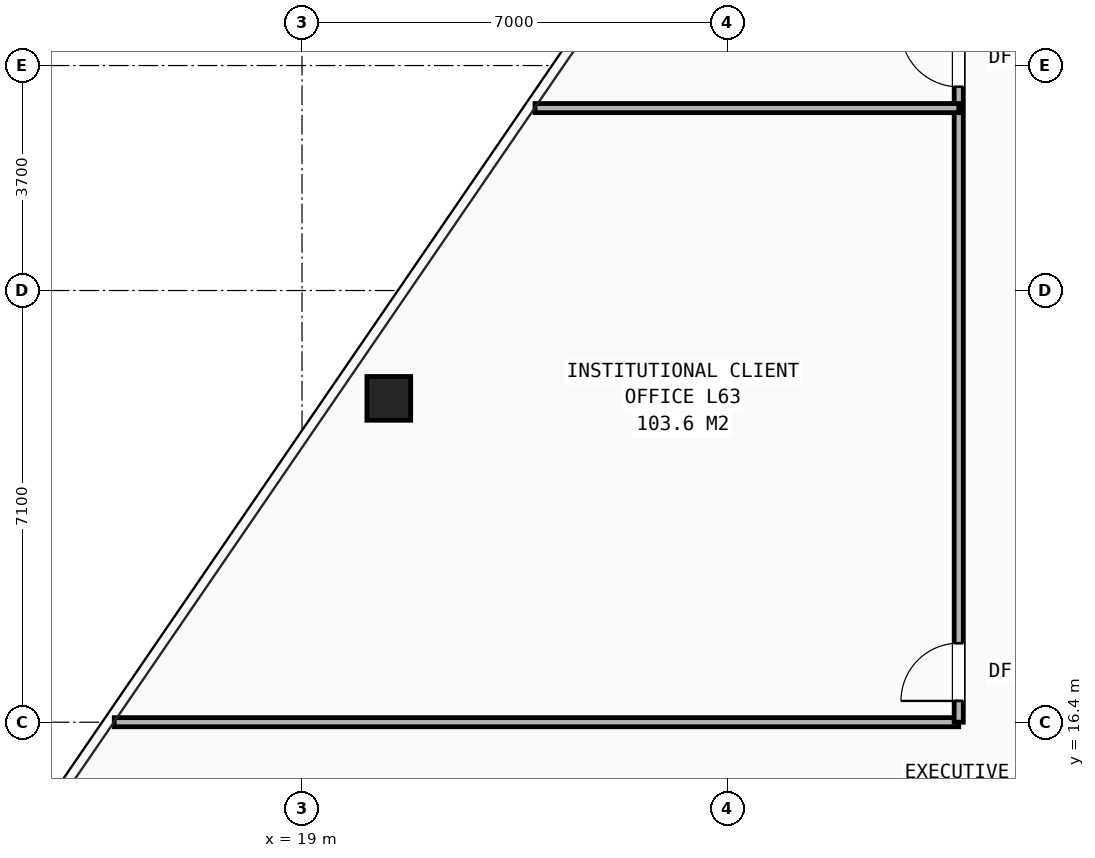
"""IFC4 building model, lengths in metres.
Left out: names, types, materials, properties, quantities, classifications, styles, units other than length and angle.
Written with IfcOpenShell. Run it as: python <this file> out.ifc"""

import sys

from ifc_helpers import new_model, si_unit, direction, frame, frame_2d, origin, origin_2d, place, context, subcontext, project, spatial, rectangle, hollow_rectangle, extrude, element, fill, save


model = new_model("IFC4")
c1 = context("Model", 3, precision=1e-05, world=origin(), true_north=direction((0.0, 1.0)))
c2 = subcontext(c1, "Body", "Model", "MODEL_VIEW")
j1 = project(units=[si_unit("LENGTHUNIT", "METRE"), si_unit("PLANEANGLEUNIT", "RADIAN")], contexts=[c1])
p1 = place(None, origin())
s1 = spatial("IfcSite", under=j1, at=p1, CompositionType="ELEMENT")
p2 = place(p1, origin())
s2 = spatial("IfcBuilding", under=s1, at=p2, CompositionType="ELEMENT")
p3 = place(p2, frame((0.0, 0.0, 222.4)))
s3 = spatial("IfcBuildingStorey", under=s2, at=p3, CompositionType="ELEMENT", Elevation=222.4)
p4 = place(p3, frame((20.427, 21.726, 0.0), z_axis=(0.0, 0.0, 1.0), x_axis=(1.0, 0.0, 0.0)))
e1 = element("IfcColumn", 1, at=p4, inside=s3, PredefinedType="COLUMN", context=c2, shape_type="SweptSolid", body=[
    extrude(hollow_rectangle(XDim=0.72, YDim=0.72, WallThickness=0.05, at=origin_2d()), origin(), (0.0, 0.0, 1.0), 3.5),
])
p5 = place(p3, frame((15.912, 16.4, 0.0), z_axis=(0.0, 0.0, 1.0), x_axis=(1.0, 0.0, 0.0)))
e2 = element("IfcWall", 2, at=p5, inside=s3, PredefinedType="PARTITIONING", context=c2, shape_type="SweptSolid", body=[
    extrude(rectangle(XDim=13.888, YDim=0.15, at=frame_2d((6.944, 0.0))), origin(), (0.0, 0.0, 1.0), 2.265),
])
p6 = place(p3, frame((29.8, 16.4, 0.0), z_axis=(0.0, 0.0, 1.0), x_axis=(0.0, 1.0, 0.0)))
e3 = element("IfcWall", 3, at=p6, inside=s3, PredefinedType="PARTITIONING", context=c2, shape_type="SweptSolid", body=[
    extrude(rectangle(XDim=19.3, YDim=0.15, at=frame_2d((9.65, 0.0))), origin(), (0.0, 0.0, 1.0), 2.265),
])
p7 = place(p6, frame((0.35, 0.0, 0.0)))
e4 = element("IfcOpeningElement", 4, at=p7, cuts=e3, PredefinedType="OPENING", context=c2, shape_type="SweptSolid", body=[
    extrude(rectangle(XDim=0.95, YDim=2.1, at=frame_2d((0.475, 1.05))), frame((0.0, 0.085, 0.0), z_axis=(0.0, -1.0, 0.0), x_axis=(1.0, 0.0, 0.0)), (0.0, 0.0, 1.0), 0.17),
])
p8 = place(p6, frame((10.45, 0.0, 0.0)))
e5 = element("IfcOpeningElement", 5, at=p8, cuts=e3, PredefinedType="OPENING", context=c2, shape_type="SweptSolid", body=[
    extrude(rectangle(XDim=0.95, YDim=2.1, at=frame_2d((0.475, 1.05))), frame((0.0, 0.085, 0.0), z_axis=(0.0, -1.0, 0.0), x_axis=(1.0, 0.0, 0.0)), (0.0, 0.0, 1.0), 0.17),
])
p9 = place(p3, frame((22.831, 26.5, 0.0), z_axis=(0.0, 0.0, 1.0), x_axis=(1.0, 0.0, 0.0)))
e6 = element("IfcWall", 6, at=p9, inside=s3, PredefinedType="PARTITIONING", context=c2, shape_type="SweptSolid", body=[
    extrude(rectangle(XDim=6.969, YDim=0.15, at=frame_2d((3.484, 0.0))), origin(), (0.0, 0.0, 1.0), 2.628),
])
p10 = place(p7, origin())
e7 = element("IfcDoor", 7, at=p10, inside=s3, OperationType="SINGLE_SWING_LEFT", PredefinedType="DOOR", context=c2, shape_type="SweptSolid", body=[
    extrude(rectangle(XDim=0.95, YDim=2.1, at=frame_2d((0.475, 1.05))), frame((0.0, 0.025, 0.0), z_axis=(0.0, -1.0, 0.0), x_axis=(1.0, 0.0, 0.0)), (0.0, 0.0, 1.0), 0.05),
])
fill(e4, e7)
p11 = place(p8, origin())
e8 = element("IfcDoor", 8, at=p11, inside=s3, OperationType="SINGLE_SWING_RIGHT", PredefinedType="DOOR", context=c2, shape_type="SweptSolid", body=[
    extrude(rectangle(XDim=0.95, YDim=2.1, at=frame_2d((0.475, 1.05))), frame((0.0, 0.025, 0.0), z_axis=(0.0, -1.0, 0.0), x_axis=(1.0, 0.0, 0.0)), (0.0, 0.0, 1.0), 0.05),
])
fill(e5, e8)
save(model, sys.argv[1])
